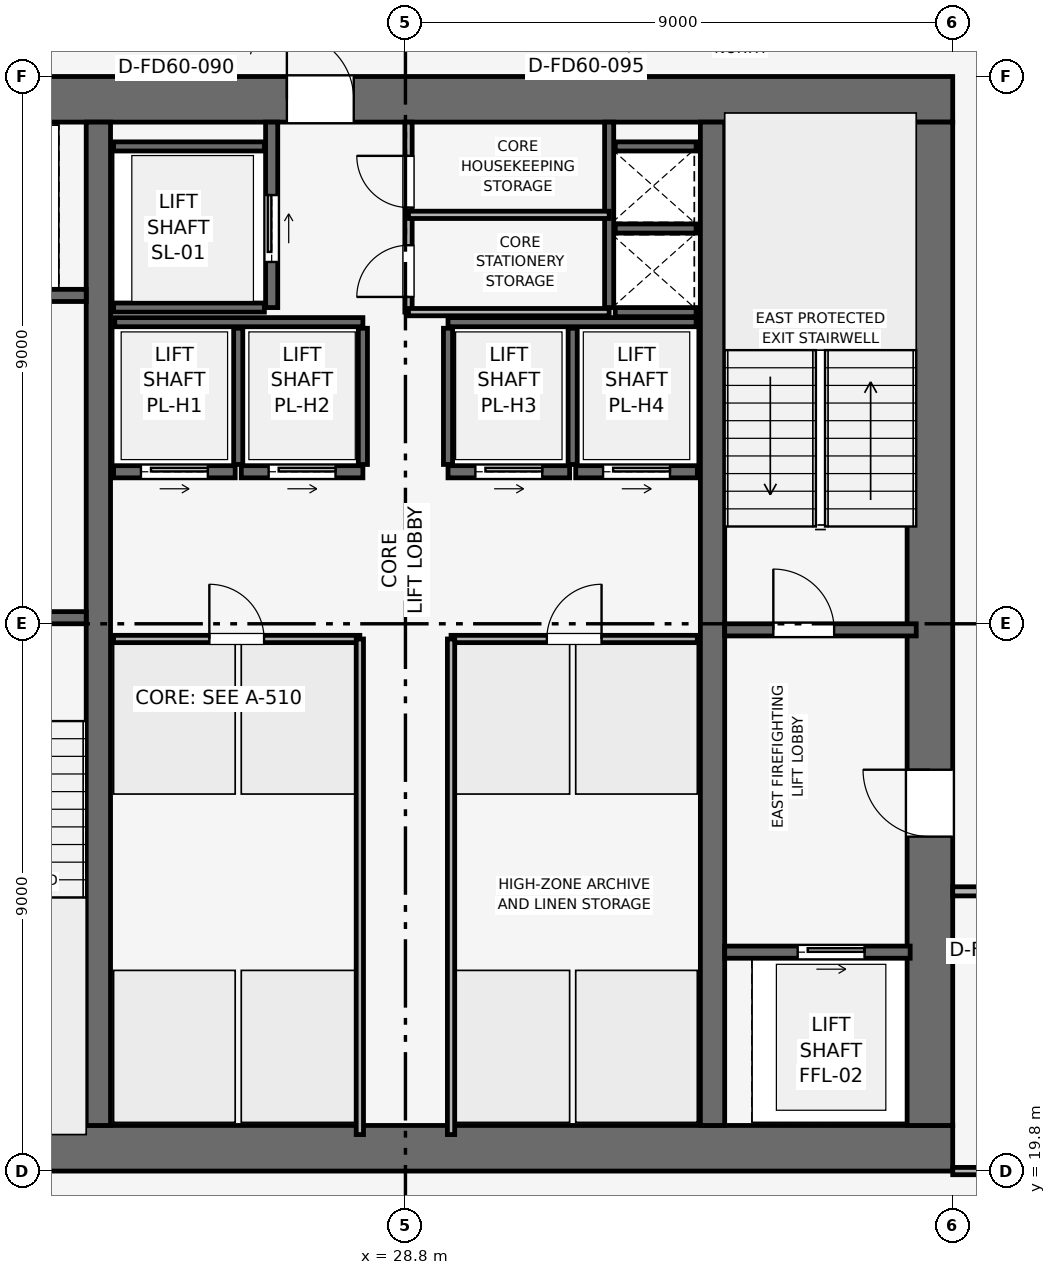
"""IFC4 building model, lengths in metres.
Left out: names, types, materials, properties, quantities, classifications, styles, units other than length and angle.
Written with IfcOpenShell. Run it as: python <this file> out.ifc"""

import sys

from ifc_helpers import new_model, si_unit, direction, frame, frame_2d, origin, place, context, subcontext, project, spatial, rectangle, extrude, element, fill, save


model = new_model("IFC4")
c1 = context("Model", 3, precision=1e-05, world=origin(), true_north=direction((0.0, 1.0)))
c2 = subcontext(c1, "Body", "Model", "MODEL_VIEW")
j1 = project(units=[si_unit("LENGTHUNIT", "METRE"), si_unit("PLANEANGLEUNIT", "RADIAN")], contexts=[c1])
p1 = place(None, origin())
s1 = spatial("IfcSite", under=j1, at=p1, CompositionType="ELEMENT")
p2 = place(p1, origin())
s2 = spatial("IfcBuilding", under=s1, at=p2, CompositionType="ELEMENT")
p3 = place(p2, frame((0.0, 0.0, 257.85)))
s3 = spatial("IfcBuildingStorey", under=s2, at=p3, CompositionType="ELEMENT", Elevation=257.85)
p4 = place(p3, frame((19.8, 20.175, 0.0), z_axis=(0.0, 0.0, 1.0), x_axis=(1.0, 0.0, 0.0)))
e1 = element("IfcWall", 1, at=p4, inside=s3, PredefinedType="SHEAR", context=c2, shape_type="SweptSolid", body=[
    extrude(rectangle(XDim=18.0, YDim=0.75, at=frame_2d((9.0, 0.0))), origin(), (0.0, 0.0, 1.0), 3.75),
])
p5 = place(p3, frame((19.8, 37.425, 0.0), z_axis=(0.0, 0.0, 1.0), x_axis=(1.0, 0.0, 0.0)))
e2 = element("IfcWall", 2, at=p5, inside=s3, PredefinedType="SHEAR", context=c2, shape_type="SweptSolid", body=[
    extrude(rectangle(XDim=18.0, YDim=0.75, at=frame_2d((9.0, 0.0))), origin(), (0.0, 0.0, 1.0), 3.75),
])
p6 = place(p5, frame((7.05, 0.0, 0.0)))
e3 = element("IfcOpeningElement", 3, at=p6, cuts=e2, PredefinedType="OPENING", context=c2, shape_type="SweptSolid", body=[
    extrude(rectangle(XDim=1.1, YDim=2.15, at=frame_2d((0.55, 1.075))), frame((0.0, 0.385, 0.0), z_axis=(0.0, -1.0, 0.0), x_axis=(1.0, 0.0, 0.0)), (0.0, 0.0, 1.0), 0.77),
])
p7 = place(p3, frame((37.425, 20.55, 0.0), z_axis=(0.0, 0.0, 1.0), x_axis=(0.0, 1.0, 0.0)))
e4 = element("IfcWall", 4, at=p7, inside=s3, PredefinedType="SHEAR", context=c2, shape_type="SweptSolid", body=[
    extrude(rectangle(XDim=16.5, YDim=0.75, at=frame_2d((8.25, 0.0))), origin(), (0.0, 0.0, 1.0), 3.75),
])
p8 = place(p7, frame((4.75, 0.0, 0.0)))
e5 = element("IfcOpeningElement", 5, at=p8, cuts=e4, PredefinedType="OPENING", context=c2, shape_type="SweptSolid", body=[
    extrude(rectangle(XDim=1.1, YDim=2.15, at=frame_2d((0.55, 1.075))), frame((0.0, 0.385, 0.0), z_axis=(0.0, -1.0, 0.0), x_axis=(1.0, 0.0, 0.0)), (0.0, 0.0, 1.0), 0.77),
])
for number, where, z_axis, x_axis in (
    (6, (23.75, 20.55, 0.0), (0.0, 0.0, 1.0), (0.0, 1.0, 0.0)),
    (7, (33.85, 20.55, 0.0), (0.0, 0.0, 1.0), (0.0, 1.0, 0.0)),
):
    element("IfcWall", number, at=place(p3, frame(where, z_axis=z_axis, x_axis=x_axis)), inside=s3, PredefinedType="SHEAR", context=c2, shape_type="SweptSolid", body=[
        extrude(rectangle(XDim=16.5, YDim=0.4, at=frame_2d((8.25, 0.0))), origin(), (0.0, 0.0, 1.0), 3.75),
    ])
p9 = place(p3, frame((20.4, 28.9, 0.0), z_axis=(0.0, 0.0, 1.0), x_axis=(1.0, 0.0, 0.0)))
e8 = element("IfcWall", 8, at=p9, inside=s3, PredefinedType="SHEAR", context=c2, shape_type="SweptSolid", body=[
    extrude(rectangle(XDim=3.15, YDim=0.2, at=frame_2d((1.575, 0.0))), origin(), (0.0, 0.0, 1.0), 3.5),
])
p10 = place(p9, frame((0.8, 0.0, 0.0)))
e9 = element("IfcOpeningElement", 9, at=p10, cuts=e8, PredefinedType="OPENING", context=c2, shape_type="SweptSolid", body=[
    extrude(rectangle(XDim=1.0, YDim=2.1, at=frame_2d((0.5, 1.05))), frame((0.0, 0.11, 0.0), z_axis=(0.0, -1.0, 0.0), x_axis=(1.0, 0.0, 0.0)), (0.0, 0.0, 1.0), 0.22),
])
p11 = place(p3, frame((34.05, 28.7, 0.0), z_axis=(0.0, 0.0, 1.0), x_axis=(1.0, 0.0, 0.0)))
e10 = element("IfcWall", 10, at=p11, inside=s3, PredefinedType="SHEAR", context=c2, shape_type="SweptSolid", body=[
    extrude(rectangle(XDim=3.15, YDim=0.2, at=frame_2d((1.575, 0.0))), origin(), (0.0, 0.0, 1.0), 3.5),
])
p12 = place(p11, frame((0.8, 0.0, 0.0)))
e11 = element("IfcOpeningElement", 11, at=p12, cuts=e10, PredefinedType="OPENING", context=c2, shape_type="SweptSolid", body=[
    extrude(rectangle(XDim=1.0, YDim=2.1, at=frame_2d((0.5, 1.05))), frame((0.0, 0.11, 0.0), z_axis=(0.0, -1.0, 0.0), x_axis=(1.0, 0.0, 0.0)), (0.0, 0.0, 1.0), 0.22),
])
p13 = place(p3, frame((32.15, 34.0, 0.0), z_axis=(0.0, 0.0, 1.0), x_axis=(0.0, 1.0, 0.0)))
e12 = element("IfcWall", 12, at=p13, inside=s3, PredefinedType="SHEAR", context=c2, shape_type="SweptSolid", body=[
    extrude(rectangle(XDim=3.05, YDim=0.15, at=frame_2d((1.525, 0.0))), origin(), (0.0, 0.0, 1.0), 3.5),
])
for number, where, z_axis, x_axis in (
    (13, (32.25, 33.925, 0.0), (0.0, 0.0, 1.0), (1.0, 0.0, 0.0)),
    (14, (32.25, 35.3, 0.0), (0.0, 0.0, 1.0), (1.0, 0.0, 0.0)),
):
    element("IfcWall", number, at=place(p3, frame(where, z_axis=z_axis, x_axis=x_axis)), inside=s3, PredefinedType="SHEAR", context=c2, shape_type="SweptSolid", body=[
        extrude(rectangle(XDim=1.33, YDim=0.15, at=frame_2d((0.665, 0.0))), origin(), (0.0, 0.0, 1.0), 3.5),
    ])
p14 = place(p3, frame((20.5, 34.2, 0.0), z_axis=(0.0, 0.0, 1.0), x_axis=(1.0, 0.0, 0.0)))
e15 = element("IfcWall", 15, at=p14, inside=s3, PredefinedType="SHEAR", context=c2, shape_type="SweptSolid", body=[
    extrude(rectangle(XDim=3.05, YDim=0.2, at=frame_2d((1.525, 0.0))), origin(), (0.0, 0.0, 1.0), 3.5),
])
p15 = place(p14, frame((0.75, 0.0, 0.0)))
e16 = element("IfcOpeningElement", 16, at=p15, cuts=e15, PredefinedType="OPENING", context=c2, shape_type="SweptSolid", body=[
    extrude(rectangle(XDim=1.1, YDim=2.15, at=frame_2d((0.55, 1.075))), frame((0.0, 0.11, 0.0), z_axis=(0.0, -1.0, 0.0), x_axis=(1.0, 0.0, 0.0)), (0.0, 0.0, 1.0), 0.22),
])
p16 = place(p3, frame((34.05, 23.4, 0.0), z_axis=(0.0, 0.0, 1.0), x_axis=(1.0, 0.0, 0.0)))
e17 = element("IfcWall", 17, at=p16, inside=s3, PredefinedType="SHEAR", context=c2, shape_type="SweptSolid", body=[
    extrude(rectangle(XDim=3.05, YDim=0.2, at=frame_2d((1.525, 0.0))), origin(), (0.0, 0.0, 1.0), 3.5),
])
p17 = place(p16, frame((1.2, 0.0, 0.0)))
e18 = element("IfcOpeningElement", 18, at=p17, cuts=e17, PredefinedType="OPENING", context=c2, shape_type="SweptSolid", body=[
    extrude(rectangle(XDim=1.1, YDim=2.15, at=frame_2d((0.55, 1.075))), frame((0.0, 0.11, 0.0), z_axis=(0.0, -1.0, 0.0), x_axis=(1.0, 0.0, 0.0)), (0.0, 0.0, 1.0), 0.22),
])
p18 = place(p3, frame((26.6, 34.0, 0.0), z_axis=(0.0, 0.0, 1.0), x_axis=(0.0, 1.0, 0.0)))
e19 = element("IfcWall", 19, at=p18, inside=s3, PredefinedType="SHEAR", context=c2, shape_type="SweptSolid", body=[
    extrude(rectangle(XDim=3.05, YDim=0.2, at=frame_2d((1.525, 0.0))), origin(), (0.0, 0.0, 1.0), 3.5),
])
p19 = place(p18, frame((0.75, 0.0, 0.0)))
e20 = element("IfcOpeningElement", 20, at=p19, cuts=e19, PredefinedType="OPENING", context=c2, shape_type="SweptSolid", body=[
    extrude(rectangle(XDim=1.1, YDim=2.15, at=frame_2d((0.55, 1.075))), frame((0.0, 0.11, 0.0), z_axis=(0.0, -1.0, 0.0), x_axis=(1.0, 0.0, 0.0)), (0.0, 0.0, 1.0), 0.22),
])
for number, where, z_axis, x_axis in (
    (21, (24.0, 34.0, 0.0), (0.0, 0.0, 1.0), (1.0, 0.0, 0.0)),
    (22, (24.0, 36.65, 0.0), (0.0, 0.0, 1.0), (1.0, 0.0, 0.0)),
):
    element("IfcWall", number, at=place(p3, frame(where, z_axis=z_axis, x_axis=x_axis)), inside=s3, PredefinedType="SHEAR", context=c2, shape_type="SweptSolid", body=[
        extrude(rectangle(XDim=2.48, YDim=0.15, at=frame_2d((1.24, 0.0))), origin(), (0.0, 0.0, 1.0), 3.5),
    ])
p20 = place(p3, frame((24.0, 31.3, 0.0), z_axis=(0.0, 0.0, 1.0), x_axis=(1.0, 0.0, 0.0)))
e23 = element("IfcWall", 23, at=p20, inside=s3, PredefinedType="SHEAR", context=c2, shape_type="SweptSolid", body=[
    extrude(rectangle(XDim=2.0, YDim=0.2, at=frame_2d((1.0, 0.0))), origin(), (0.0, 0.0, 1.0), 3.5),
])
p21 = place(p20, frame((0.45, 0.0, 0.0)))
e24 = element("IfcOpeningElement", 24, at=p21, cuts=e23, PredefinedType="OPENING", context=c2, shape_type="SweptSolid", body=[
    extrude(rectangle(XDim=1.1, YDim=2.15, at=frame_2d((0.55, 1.075))), frame((0.0, 0.11, 0.0), z_axis=(0.0, -1.0, 0.0), x_axis=(1.0, 0.0, 0.0)), (0.0, 0.0, 1.0), 0.22),
])
p22 = place(p3, frame((26.1, 31.3, 0.0), z_axis=(0.0, 0.0, 1.0), x_axis=(1.0, 0.0, 0.0)))
e25 = element("IfcWall", 25, at=p22, inside=s3, PredefinedType="SHEAR", context=c2, shape_type="SweptSolid", body=[
    extrude(rectangle(XDim=2.0, YDim=0.2, at=frame_2d((1.0, 0.0))), origin(), (0.0, 0.0, 1.0), 3.5),
])
p23 = place(p22, frame((0.45, 0.0, 0.0)))
e26 = element("IfcOpeningElement", 26, at=p23, cuts=e25, PredefinedType="OPENING", context=c2, shape_type="SweptSolid", body=[
    extrude(rectangle(XDim=1.1, YDim=2.15, at=frame_2d((0.55, 1.075))), frame((0.0, 0.11, 0.0), z_axis=(0.0, -1.0, 0.0), x_axis=(1.0, 0.0, 0.0)), (0.0, 0.0, 1.0), 0.22),
])
p24 = place(p3, frame((29.5, 31.3, 0.0), z_axis=(0.0, 0.0, 1.0), x_axis=(1.0, 0.0, 0.0)))
e27 = element("IfcWall", 27, at=p24, inside=s3, PredefinedType="SHEAR", context=c2, shape_type="SweptSolid", body=[
    extrude(rectangle(XDim=2.0, YDim=0.2, at=frame_2d((1.0, 0.0))), origin(), (0.0, 0.0, 1.0), 3.5),
])
p25 = place(p24, frame((0.45, 0.0, 0.0)))
e28 = element("IfcOpeningElement", 28, at=p25, cuts=e27, PredefinedType="OPENING", context=c2, shape_type="SweptSolid", body=[
    extrude(rectangle(XDim=1.1, YDim=2.15, at=frame_2d((0.55, 1.075))), frame((0.0, 0.11, 0.0), z_axis=(0.0, -1.0, 0.0), x_axis=(1.0, 0.0, 0.0)), (0.0, 0.0, 1.0), 0.22),
])
p26 = place(p3, frame((31.6, 31.3, 0.0), z_axis=(0.0, 0.0, 1.0), x_axis=(1.0, 0.0, 0.0)))
e29 = element("IfcWall", 29, at=p26, inside=s3, PredefinedType="SHEAR", context=c2, shape_type="SweptSolid", body=[
    extrude(rectangle(XDim=2.0, YDim=0.2, at=frame_2d((1.0, 0.0))), origin(), (0.0, 0.0, 1.0), 3.5),
])
p27 = place(p26, frame((0.45, 0.0, 0.0)))
e30 = element("IfcOpeningElement", 30, at=p27, cuts=e29, PredefinedType="OPENING", context=c2, shape_type="SweptSolid", body=[
    extrude(rectangle(XDim=1.1, YDim=2.15, at=frame_2d((0.55, 1.075))), frame((0.0, 0.11, 0.0), z_axis=(0.0, -1.0, 0.0), x_axis=(1.0, 0.0, 0.0)), (0.0, 0.0, 1.0), 0.22),
])
p28 = place(p3, frame((32.25, 36.65, 0.0), z_axis=(0.0, 0.0, 1.0), x_axis=(1.0, 0.0, 0.0)))
e31 = element("IfcWall", 31, at=p28, inside=s3, PredefinedType="SHEAR", context=c2, shape_type="SweptSolid", body=[
    extrude(rectangle(XDim=1.33, YDim=0.15, at=frame_2d((0.665, 0.0))), origin(), (0.0, 0.0, 1.0), 3.5),
])
for number, where, z_axis, x_axis in (
    (32, (24.02, 33.76, 0.0), (0.0, 0.0, 1.0), (1.0, 0.0, 0.0)),
    (33, (29.5, 33.76, 0.0), (0.0, 0.0, 1.0), (1.0, 0.0, 0.0)),
):
    element("IfcWall", number, at=place(p3, frame(where, z_axis=z_axis, x_axis=x_axis)), inside=s3, PredefinedType="SHEAR", context=c2, shape_type="SweptSolid", body=[
        extrude(rectangle(XDim=4.08, YDim=0.15, at=frame_2d((2.04, 0.0))), origin(), (0.0, 0.0, 1.0), 3.5),
    ])
for number, where, z_axis, x_axis in (
    (34, (26.05, 31.42, 0.0), (0.0, 0.0, 1.0), (0.0, 1.0, 0.0)),
    (35, (28.1, 31.42, 0.0), (0.0, 0.0, 1.0), (0.0, 1.0, 0.0)),
    (36, (29.5, 31.42, 0.0), (0.0, 0.0, 1.0), (0.0, 1.0, 0.0)),
    (37, (31.55, 31.42, 0.0), (0.0, 0.0, 1.0), (0.0, 1.0, 0.0)),
):
    element("IfcWall", number, at=place(p3, frame(where, z_axis=z_axis, x_axis=x_axis)), inside=s3, PredefinedType="SHEAR", context=c2, shape_type="SweptSolid", body=[
        extrude(rectangle(XDim=2.24, YDim=0.15, at=frame_2d((1.12, 0.0))), origin(), (0.0, 0.0, 1.0), 3.5),
    ])
p29 = place(p3, frame((28.85, 33.925, 0.0), z_axis=(0.0, 0.0, 1.0), x_axis=(0.0, 1.0, 0.0)))
e38 = element("IfcWall", 38, at=p29, inside=s3, PredefinedType="PARTITIONING", context=c2, shape_type="SweptSolid", body=[
    extrude(rectangle(XDim=3.125, YDim=0.12, at=frame_2d((1.562, 0.0))), origin(), (0.0, 0.0, 1.0), 3.5),
])
p30 = place(p29, frame((0.25, 0.0, 0.0)))
e39 = element("IfcOpeningElement", 39, at=p30, cuts=e38, PredefinedType="OPENING", context=c2, shape_type="SweptSolid", body=[
    extrude(rectangle(XDim=0.85, YDim=2.1, at=frame_2d((0.425, 1.05))), frame((0.0, 0.07, 0.0), z_axis=(0.0, -1.0, 0.0), x_axis=(1.0, 0.0, 0.0)), (0.0, 0.0, 1.0), 0.14),
])
p31 = place(p29, frame((1.72, 0.0, 0.0)))
e40 = element("IfcOpeningElement", 40, at=p31, cuts=e38, PredefinedType="OPENING", context=c2, shape_type="SweptSolid", body=[
    extrude(rectangle(XDim=0.85, YDim=2.1, at=frame_2d((0.425, 1.05))), frame((0.0, 0.07, 0.0), z_axis=(0.0, -1.0, 0.0), x_axis=(1.0, 0.0, 0.0)), (0.0, 0.0, 1.0), 0.14),
])
for number, where, z_axis, x_axis in (
    (41, (28.85, 35.525, 0.0), (0.0, 0.0, 1.0), (1.0, 0.0, 0.0)),
    (42, (28.85, 33.925, 0.0), (0.0, 0.0, 1.0), (1.0, 0.0, 0.0)),
):
    element("IfcWall", number, at=place(p3, frame(where, z_axis=z_axis, x_axis=x_axis)), inside=s3, PredefinedType="PARTITIONING", context=c2, shape_type="SweptSolid", body=[
        extrude(rectangle(XDim=3.3, YDim=0.12, at=frame_2d((1.65, 0.0))), origin(), (0.0, 0.0, 1.0), 3.5),
    ])
p32 = place(p3, frame((24.0, 28.55, 0.0), z_axis=(0.0, 0.0, 1.0), x_axis=(1.0, 0.0, 0.0)))
e43 = element("IfcWall", 43, at=p32, inside=s3, PredefinedType="PARTITIONING", context=c2, shape_type="SweptSolid", body=[
    extrude(rectangle(XDim=4.05, YDim=0.12, at=frame_2d((2.025, 0.0))), origin(), (0.0, 0.0, 1.0), 3.5),
])
p33 = place(p32, frame((1.575, 0.0, 0.0)))
e44 = element("IfcOpeningElement", 44, at=p33, cuts=e43, PredefinedType="OPENING", context=c2, shape_type="SweptSolid", body=[
    extrude(rectangle(XDim=0.9, YDim=2.1, at=frame_2d((0.45, 1.05))), frame((0.0, 0.07, 0.0), z_axis=(0.0, -1.0, 0.0), x_axis=(1.0, 0.0, 0.0)), (0.0, 0.0, 1.0), 0.14),
])
p34 = place(p3, frame((28.05, 20.4, 0.0), z_axis=(0.0, 0.0, 1.0), x_axis=(0.0, 1.0, 0.0)))
e45 = element("IfcWall", 45, at=p34, inside=s3, PredefinedType="PARTITIONING", context=c2, shape_type="SweptSolid", body=[
    extrude(rectangle(XDim=8.15, YDim=0.12, at=frame_2d((4.075, 0.0))), origin(), (0.0, 0.0, 1.0), 3.5),
])
p35 = place(p3, frame((29.55, 28.55, 0.0), z_axis=(0.0, 0.0, 1.0), x_axis=(1.0, 0.0, 0.0)))
e46 = element("IfcWall", 46, at=p35, inside=s3, PredefinedType="PARTITIONING", context=c2, shape_type="SweptSolid", body=[
    extrude(rectangle(XDim=4.05, YDim=0.12, at=frame_2d((2.025, 0.0))), origin(), (0.0, 0.0, 1.0), 3.5),
])
p36 = place(p35, frame((1.575, 0.0, 0.0)))
e47 = element("IfcOpeningElement", 47, at=p36, cuts=e46, PredefinedType="OPENING", context=c2, shape_type="SweptSolid", body=[
    extrude(rectangle(XDim=0.9, YDim=2.1, at=frame_2d((0.45, 1.05))), frame((0.0, 0.07, 0.0), z_axis=(0.0, -1.0, 0.0), x_axis=(1.0, 0.0, 0.0)), (0.0, 0.0, 1.0), 0.14),
])
p37 = place(p3, frame((29.55, 20.4, 0.0), z_axis=(0.0, 0.0, 1.0), x_axis=(0.0, 1.0, 0.0)))
e48 = element("IfcWall", 48, at=p37, inside=s3, PredefinedType="PARTITIONING", context=c2, shape_type="SweptSolid", body=[
    extrude(rectangle(XDim=8.15, YDim=0.12, at=frame_2d((4.075, 0.0))), origin(), (0.0, 0.0, 1.0), 3.5),
])
p38 = place(p3, frame((37.8, 19.8, 0.0), z_axis=(0.0, 0.0, 1.0), x_axis=(1.0, 0.0, 0.0)))
e49 = element("IfcWall", 49, at=p38, inside=s3, PredefinedType="PARTITIONING", context=c2, shape_type="SweptSolid", body=[
    extrude(rectangle(XDim=15.77, YDim=0.12, at=frame_2d((7.885, 0.0))), origin(), (0.0, 0.0, 1.0), 3.085),
])
p39 = place(p3, frame((37.8, 24.4, 0.0), z_axis=(0.0, 0.0, 1.0), x_axis=(1.0, 0.0, 0.0)))
e50 = element("IfcWall", 50, at=p39, inside=s3, PredefinedType="PARTITIONING", context=c2, shape_type="SweptSolid", body=[
    extrude(rectangle(XDim=1.9, YDim=0.15, at=frame_2d((0.95, 0.0))), origin(), (0.0, 0.0, 1.0), 3.5),
])
p40 = place(p39, frame((0.45, 0.0, 0.0)))
e51 = element("IfcOpeningElement", 51, at=p40, cuts=e50, PredefinedType="OPENING", context=c2, shape_type="SweptSolid", body=[
    extrude(rectangle(XDim=0.9, YDim=2.1, at=frame_2d((0.45, 1.05))), frame((0.0, 0.085, 0.0), z_axis=(0.0, -1.0, 0.0), x_axis=(1.0, 0.0, 0.0)), (0.0, 0.0, 1.0), 0.17),
])
p41 = place(p12, origin())
e52 = element("IfcDoor", 52, at=p41, inside=s3, OperationType="SINGLE_SWING_LEFT", PredefinedType="DOOR", context=c2, shape_type="SweptSolid", body=[
    extrude(rectangle(XDim=1.0, YDim=2.1, at=frame_2d((0.5, 1.05))), frame((0.0, 0.025, 0.0), z_axis=(0.0, -1.0, 0.0), x_axis=(1.0, 0.0, 0.0)), (0.0, 0.0, 1.0), 0.05),
])
fill(e11, e52)
p42 = place(p17, origin())
e53 = element("IfcDoor", 53, at=p42, inside=s3, OperationType="SLIDING_TO_RIGHT", PredefinedType="DOOR", context=c2, shape_type="SweptSolid", body=[
    extrude(rectangle(XDim=1.1, YDim=2.15, at=frame_2d((0.55, 1.075))), frame((0.0, 0.025, 0.0), z_axis=(0.0, -1.0, 0.0), x_axis=(1.0, 0.0, 0.0)), (0.0, 0.0, 1.0), 0.05),
])
fill(e18, e53)
p43 = place(p19, origin())
e54 = element("IfcDoor", 54, at=p43, inside=s3, OperationType="SLIDING_TO_RIGHT", PredefinedType="DOOR", context=c2, shape_type="SweptSolid", body=[
    extrude(rectangle(XDim=1.1, YDim=2.15, at=frame_2d((0.55, 1.075))), frame((0.0, 0.025, 0.0), z_axis=(0.0, -1.0, 0.0), x_axis=(1.0, 0.0, 0.0)), (0.0, 0.0, 1.0), 0.05),
])
fill(e20, e54)
p44 = place(p21, origin())
e55 = element("IfcDoor", 55, at=p44, inside=s3, OperationType="SLIDING_TO_RIGHT", PredefinedType="DOOR", context=c2, shape_type="SweptSolid", body=[
    extrude(rectangle(XDim=1.1, YDim=2.15, at=frame_2d((0.55, 1.075))), frame((0.0, 0.025, 0.0), z_axis=(0.0, -1.0, 0.0), x_axis=(1.0, 0.0, 0.0)), (0.0, 0.0, 1.0), 0.05),
])
fill(e24, e55)
p45 = place(p23, origin())
e56 = element("IfcDoor", 56, at=p45, inside=s3, OperationType="SLIDING_TO_RIGHT", PredefinedType="DOOR", context=c2, shape_type="SweptSolid", body=[
    extrude(rectangle(XDim=1.1, YDim=2.15, at=frame_2d((0.55, 1.075))), frame((0.0, 0.025, 0.0), z_axis=(0.0, -1.0, 0.0), x_axis=(1.0, 0.0, 0.0)), (0.0, 0.0, 1.0), 0.05),
])
fill(e26, e56)
p46 = place(p25, origin())
e57 = element("IfcDoor", 57, at=p46, inside=s3, OperationType="SLIDING_TO_RIGHT", PredefinedType="DOOR", context=c2, shape_type="SweptSolid", body=[
    extrude(rectangle(XDim=1.1, YDim=2.15, at=frame_2d((0.55, 1.075))), frame((0.0, 0.025, 0.0), z_axis=(0.0, -1.0, 0.0), x_axis=(1.0, 0.0, 0.0)), (0.0, 0.0, 1.0), 0.05),
])
fill(e28, e57)
p47 = place(p27, origin())
e58 = element("IfcDoor", 58, at=p47, inside=s3, OperationType="SLIDING_TO_RIGHT", PredefinedType="DOOR", context=c2, shape_type="SweptSolid", body=[
    extrude(rectangle(XDim=1.1, YDim=2.15, at=frame_2d((0.55, 1.075))), frame((0.0, 0.025, 0.0), z_axis=(0.0, -1.0, 0.0), x_axis=(1.0, 0.0, 0.0)), (0.0, 0.0, 1.0), 0.05),
])
fill(e30, e58)
p48 = place(p30, origin())
e59 = element("IfcDoor", 59, at=p48, inside=s3, OperationType="SINGLE_SWING_LEFT", PredefinedType="DOOR", context=c2, shape_type="SweptSolid", body=[
    extrude(rectangle(XDim=0.85, YDim=2.1, at=frame_2d((0.425, 1.05))), frame((0.0, 0.025, 0.0), z_axis=(0.0, -1.0, 0.0), x_axis=(1.0, 0.0, 0.0)), (0.0, 0.0, 1.0), 0.05),
])
fill(e39, e59)
p49 = place(p31, origin())
e60 = element("IfcDoor", 60, at=p49, inside=s3, OperationType="SINGLE_SWING_RIGHT", PredefinedType="DOOR", context=c2, shape_type="SweptSolid", body=[
    extrude(rectangle(XDim=0.85, YDim=2.1, at=frame_2d((0.425, 1.05))), frame((0.0, 0.025, 0.0), z_axis=(0.0, -1.0, 0.0), x_axis=(1.0, 0.0, 0.0)), (0.0, 0.0, 1.0), 0.05),
])
fill(e40, e60)
p50 = place(p33, origin())
e61 = element("IfcDoor", 61, at=p50, inside=s3, OperationType="SINGLE_SWING_LEFT", PredefinedType="DOOR", context=c2, shape_type="SweptSolid", body=[
    extrude(rectangle(XDim=0.9, YDim=2.1, at=frame_2d((0.45, 1.05))), frame((0.0, 0.025, 0.0), z_axis=(0.0, -1.0, 0.0), x_axis=(1.0, 0.0, 0.0)), (0.0, 0.0, 1.0), 0.05),
])
fill(e44, e61)
p51 = place(p36, origin())
e62 = element("IfcDoor", 62, at=p51, inside=s3, OperationType="SINGLE_SWING_RIGHT", PredefinedType="DOOR", context=c2, shape_type="SweptSolid", body=[
    extrude(rectangle(XDim=0.9, YDim=2.1, at=frame_2d((0.45, 1.05))), frame((0.0, 0.025, 0.0), z_axis=(0.0, -1.0, 0.0), x_axis=(1.0, 0.0, 0.0)), (0.0, 0.0, 1.0), 0.05),
])
fill(e47, e62)
p52 = place(p8, origin())
e63 = element("IfcDoor", 63, at=p52, inside=s3, OperationType="SINGLE_SWING_RIGHT", PredefinedType="DOOR", context=c2, shape_type="SweptSolid", body=[
    extrude(rectangle(XDim=1.1, YDim=2.15, at=frame_2d((0.55, 1.075))), frame((0.0, 0.025, 0.0), z_axis=(0.0, -1.0, 0.0), x_axis=(1.0, 0.0, 0.0)), (0.0, 0.0, 1.0), 0.05),
])
fill(e5, e63)
p53 = place(p6, origin())
e64 = element("IfcDoor", 64, at=p53, inside=s3, OperationType="SINGLE_SWING_LEFT", PredefinedType="DOOR", context=c2, shape_type="SweptSolid", body=[
    extrude(rectangle(XDim=1.1, YDim=2.15, at=frame_2d((0.55, 1.075))), frame((0.0, 0.025, 0.0), z_axis=(0.0, -1.0, 0.0), x_axis=(1.0, 0.0, 0.0)), (0.0, 0.0, 1.0), 0.05),
])
fill(e3, e64)
save(model, sys.argv[1])
